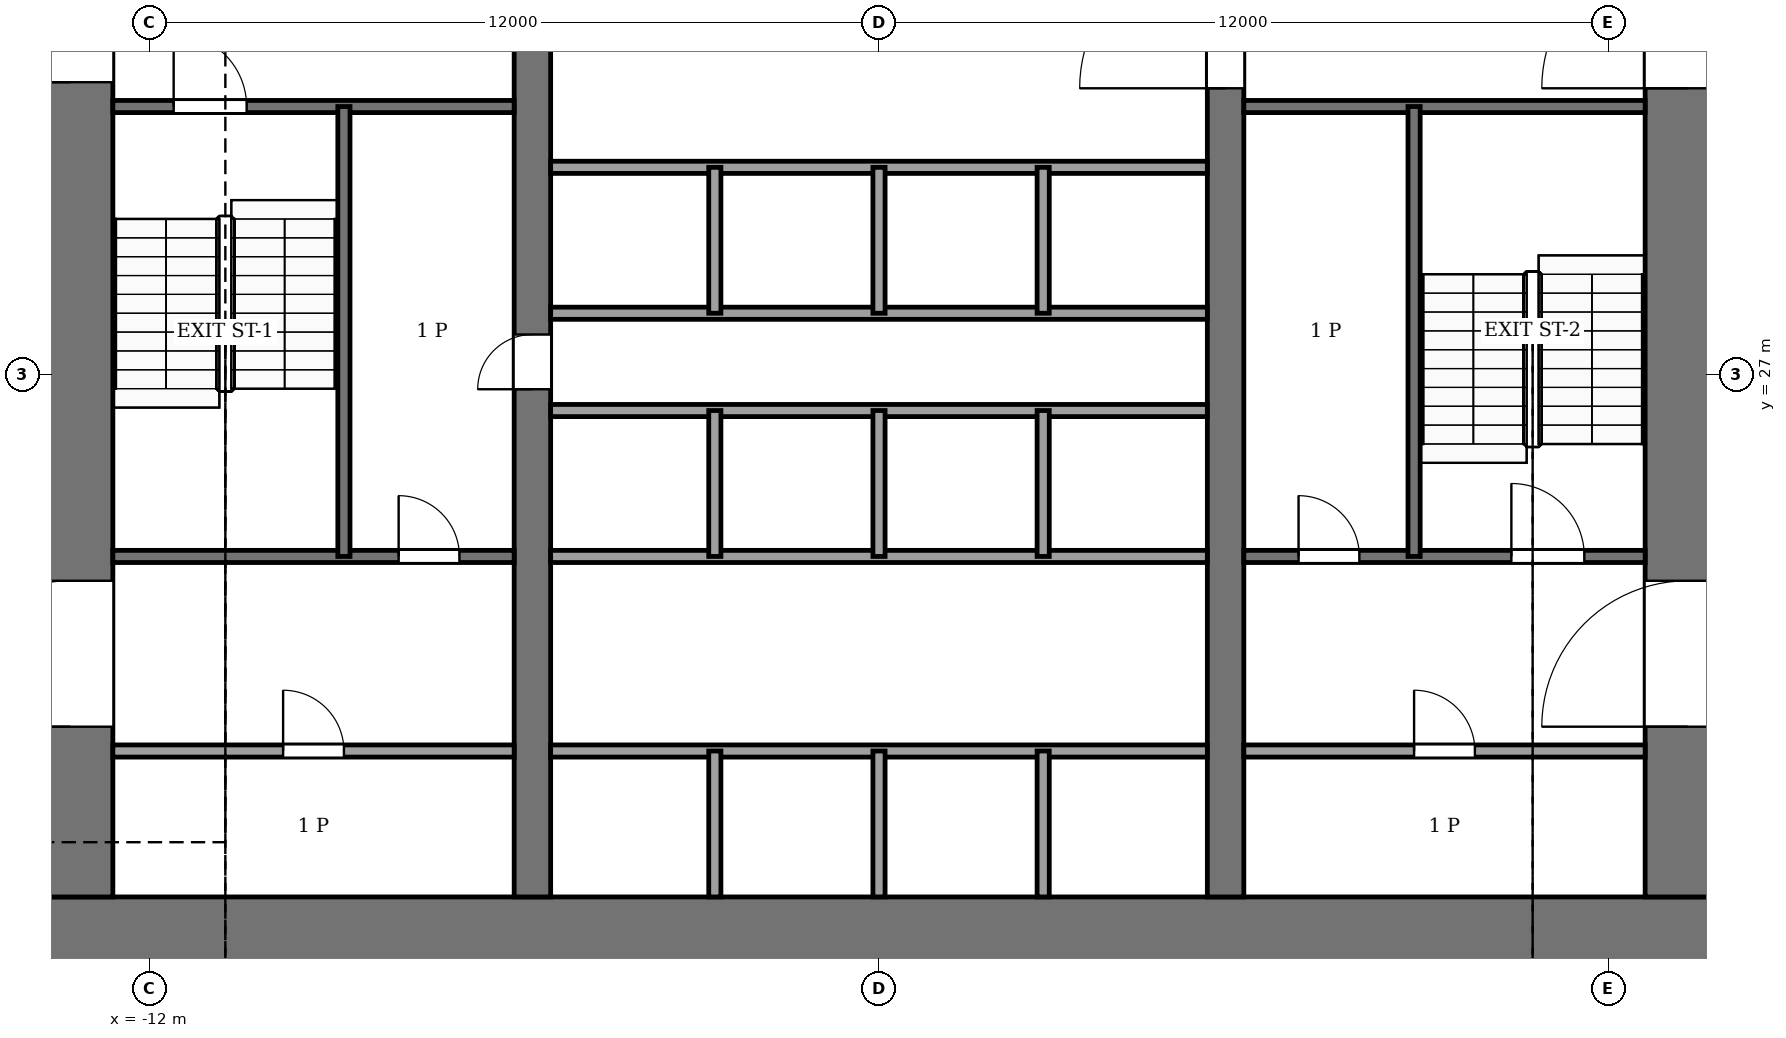
"""IFC4 building model, lengths in metres.
Left out: names, types, materials, properties, quantities, classifications, styles, units other than length and angle.
Written with IfcOpenShell. Run it as: python <this file> out.ifc"""

import sys

from ifc_helpers import new_model, si_unit, direction, frame, frame_2d, origin, place, context, subcontext, project, spatial, rectangle, extrude, element, fill, save


model = new_model("IFC4")
c1 = context("Model", 3, precision=1e-05, world=origin(), true_north=direction((0.0, 1.0)))
c2 = subcontext(c1, "Body", "Model", "MODEL_VIEW")
j1 = project(units=[si_unit("LENGTHUNIT", "METRE"), si_unit("PLANEANGLEUNIT", "RADIAN")], contexts=[c1])
p1 = place(None, origin())
s1 = spatial("IfcSite", under=j1, at=p1, CompositionType="ELEMENT")
p2 = place(p1, origin())
s2 = spatial("IfcBuilding", under=s1, at=p2, CompositionType="ELEMENT")
p3 = place(p2, frame((0.0, 0.0, 58.0)))
s3 = spatial("IfcBuildingStorey", under=s2, at=p3, CompositionType="ELEMENT", Elevation=58.0)
p4 = place(p3, frame((-14.0, 17.7, -0.25), z_axis=(0.0, 0.0, 1.0), x_axis=(1.0, 0.0, 0.0)))
e1 = element("IfcWall", 1, at=p4, inside=s3, PredefinedType="SHEAR", context=c2, shape_type="SweptSolid", body=[
    extrude(rectangle(XDim=28.0, YDim=1.4, at=frame_2d((14.0, 0.0))), origin(), (0.0, 0.0, 1.0), 7.12),
])
p5 = place(p3, frame((-13.3, 18.4, -0.25), z_axis=(0.0, 0.0, 1.0), x_axis=(0.0, 1.0, 0.0)))
e2 = element("IfcWall", 2, at=p5, inside=s3, PredefinedType="SHEAR", context=c2, shape_type="SweptSolid", body=[
    extrude(rectangle(XDim=19.2, YDim=1.4, at=frame_2d((9.6, 0.0))), origin(), (0.0, 0.0, 1.0), 7.12),
])
p6 = place(p5, frame((2.8, 0.0, 0.25)))
e3 = element("IfcOpeningElement", 3, at=p6, cuts=e2, PredefinedType="OPENING", context=c2, shape_type="SweptSolid", body=[
    extrude(rectangle(XDim=2.4, YDim=2.4, at=frame_2d((1.2, 1.2))), frame((0.0, 0.71, 0.0), z_axis=(0.0, -1.0, 0.0), x_axis=(1.0, 0.0, 0.0)), (0.0, 0.0, 1.0), 1.42),
])
p7 = place(p5, frame((13.4, 0.0, 0.25)))
e4 = element("IfcOpeningElement", 4, at=p7, cuts=e2, PredefinedType="OPENING", context=c2, shape_type="SweptSolid", body=[
    extrude(rectangle(XDim=1.4, YDim=2.2, at=frame_2d((0.7, 1.1))), frame((0.0, 0.71, 0.0), z_axis=(0.0, -1.0, 0.0), x_axis=(1.0, 0.0, 0.0)), (0.0, 0.0, 1.0), 1.42),
])
p8 = place(p3, frame((13.3, 18.4, -0.25), z_axis=(0.0, 0.0, 1.0), x_axis=(0.0, 1.0, 0.0)))
e5 = element("IfcWall", 5, at=p8, inside=s3, PredefinedType="SHEAR", context=c2, shape_type="SweptSolid", body=[
    extrude(rectangle(XDim=19.2, YDim=1.4, at=frame_2d((9.6, 0.0))), origin(), (0.0, 0.0, 1.0), 7.12),
])
p9 = place(p8, frame((2.8, 0.0, 0.25)))
e6 = element("IfcOpeningElement", 6, at=p9, cuts=e5, PredefinedType="OPENING", context=c2, shape_type="SweptSolid", body=[
    extrude(rectangle(XDim=2.4, YDim=2.4, at=frame_2d((1.2, 1.2))), frame((0.0, 0.71, 0.0), z_axis=(0.0, -1.0, 0.0), x_axis=(1.0, 0.0, 0.0)), (0.0, 0.0, 1.0), 1.42),
])
p10 = place(p8, frame((13.3, 0.0, 0.25)))
e7 = element("IfcOpeningElement", 7, at=p10, cuts=e5, PredefinedType="OPENING", context=c2, shape_type="SweptSolid", body=[
    extrude(rectangle(XDim=2.4, YDim=2.4, at=frame_2d((1.2, 1.2))), frame((0.0, 0.71, 0.0), z_axis=(0.0, -1.0, 0.0), x_axis=(1.0, 0.0, 0.0)), (0.0, 0.0, 1.0), 1.42),
])
p11 = place(p3, frame((-5.7, 18.4, -0.25), z_axis=(0.0, 0.0, 1.0), x_axis=(0.0, 1.0, 0.0)))
e8 = element("IfcWall", 8, at=p11, inside=s3, PredefinedType="SHEAR", context=c2, shape_type="SweptSolid", body=[
    extrude(rectangle(XDim=19.2, YDim=0.6, at=frame_2d((9.6, 0.0))), origin(), (0.0, 0.0, 1.0), 7.12),
])
p12 = place(p11, frame((8.35, 0.0, 0.25)))
e9 = element("IfcOpeningElement", 9, at=p12, cuts=e8, PredefinedType="OPENING", context=c2, shape_type="SweptSolid", body=[
    extrude(rectangle(XDim=0.9, YDim=2.1, at=frame_2d((0.45, 1.05))), frame((0.0, 0.31, 0.0), z_axis=(0.0, -1.0, 0.0), x_axis=(1.0, 0.0, 0.0)), (0.0, 0.0, 1.0), 0.62),
])
p13 = place(p3, frame((5.7, 18.4, -0.25), z_axis=(0.0, 0.0, 1.0), x_axis=(0.0, 1.0, 0.0)))
e10 = element("IfcWall", 10, at=p13, inside=s3, PredefinedType="SHEAR", context=c2, shape_type="SweptSolid", body=[
    extrude(rectangle(XDim=19.2, YDim=0.6, at=frame_2d((9.6, 0.0))), origin(), (0.0, 0.0, 1.0), 7.12),
])
p14 = place(p13, frame((13.3, 0.0, 0.25)))
e11 = element("IfcOpeningElement", 11, at=p14, cuts=e10, PredefinedType="OPENING", context=c2, shape_type="SweptSolid", body=[
    extrude(rectangle(XDim=2.4, YDim=2.4, at=frame_2d((1.2, 1.2))), frame((0.0, 0.31, 0.0), z_axis=(0.0, -1.0, 0.0), x_axis=(1.0, 0.0, 0.0)), (0.0, 0.0, 1.0), 0.62),
])
p15 = place(p3, frame((-12.6, 20.8, 0.0), z_axis=(0.0, 0.0, 1.0), x_axis=(1.0, 0.0, 0.0)))
e12 = element("IfcWall", 12, at=p15, inside=s3, PredefinedType="PARTITIONING", context=c2, shape_type="SweptSolid", body=[
    extrude(rectangle(XDim=6.6, YDim=0.2, at=frame_2d((3.3, 0.0))), origin(), (0.0, 0.0, 1.0), 6.87),
])
p16 = place(p15, frame((2.8, 0.0, 0.0)))
e13 = element("IfcOpeningElement", 13, at=p16, cuts=e12, PredefinedType="OPENING", context=c2, shape_type="SweptSolid", body=[
    extrude(rectangle(XDim=1.0, YDim=2.1, at=frame_2d((0.5, 1.05))), frame((0.0, 0.11, 0.0), z_axis=(0.0, -1.0, 0.0), x_axis=(1.0, 0.0, 0.0)), (0.0, 0.0, 1.0), 0.22),
])
p17 = place(p3, frame((-5.4, 20.8, 0.0), z_axis=(0.0, 0.0, 1.0), x_axis=(1.0, 0.0, 0.0)))
e14 = element("IfcWall", 14, at=p17, inside=s3, PredefinedType="PARTITIONING", context=c2, shape_type="SweptSolid", body=[
    extrude(rectangle(XDim=10.8, YDim=0.2, at=frame_2d((5.4, 0.0))), origin(), (0.0, 0.0, 1.0), 6.87),
])
p18 = place(p3, frame((6.0, 20.8, 0.0), z_axis=(0.0, 0.0, 1.0), x_axis=(1.0, 0.0, 0.0)))
e15 = element("IfcWall", 15, at=p18, inside=s3, PredefinedType="PARTITIONING", context=c2, shape_type="SweptSolid", body=[
    extrude(rectangle(XDim=6.6, YDim=0.2, at=frame_2d((3.3, 0.0))), origin(), (0.0, 0.0, 1.0), 6.87),
])
p19 = place(p18, frame((2.8, 0.0, 0.0)))
e16 = element("IfcOpeningElement", 16, at=p19, cuts=e15, PredefinedType="OPENING", context=c2, shape_type="SweptSolid", body=[
    extrude(rectangle(XDim=1.0, YDim=2.1, at=frame_2d((0.5, 1.05))), frame((0.0, 0.11, 0.0), z_axis=(0.0, -1.0, 0.0), x_axis=(1.0, 0.0, 0.0)), (0.0, 0.0, 1.0), 0.22),
])
p20 = place(p3, frame((-12.6, 24.0, 0.0), z_axis=(0.0, 0.0, 1.0), x_axis=(1.0, 0.0, 0.0)))
e17 = element("IfcWall", 17, at=p20, inside=s3, PredefinedType="PARTITIONING", context=c2, shape_type="SweptSolid", body=[
    extrude(rectangle(XDim=6.6, YDim=0.2, at=frame_2d((3.3, 0.0))), origin(), (0.0, 0.0, 1.0), 6.87),
])
p21 = place(p20, frame((4.7, 0.0, 0.0)))
e18 = element("IfcOpeningElement", 18, at=p21, cuts=e17, PredefinedType="OPENING", context=c2, shape_type="SweptSolid", body=[
    extrude(rectangle(XDim=1.0, YDim=2.1, at=frame_2d((0.5, 1.05))), frame((0.0, 0.11, 0.0), z_axis=(0.0, -1.0, 0.0), x_axis=(1.0, 0.0, 0.0)), (0.0, 0.0, 1.0), 0.22),
])
p22 = place(p3, frame((-5.4, 24.0, 0.0), z_axis=(0.0, 0.0, 1.0), x_axis=(1.0, 0.0, 0.0)))
e19 = element("IfcWall", 19, at=p22, inside=s3, PredefinedType="PARTITIONING", context=c2, shape_type="SweptSolid", body=[
    extrude(rectangle(XDim=10.8, YDim=0.2, at=frame_2d((5.4, 0.0))), origin(), (0.0, 0.0, 1.0), 6.87),
])
p23 = place(p3, frame((6.0, 24.0, 0.0), z_axis=(0.0, 0.0, 1.0), x_axis=(1.0, 0.0, 0.0)))
e20 = element("IfcWall", 20, at=p23, inside=s3, PredefinedType="PARTITIONING", context=c2, shape_type="SweptSolid", body=[
    extrude(rectangle(XDim=6.6, YDim=0.2, at=frame_2d((3.3, 0.0))), origin(), (0.0, 0.0, 1.0), 6.87),
])
p24 = place(p23, frame((0.9, 0.0, 0.0)))
e21 = element("IfcOpeningElement", 21, at=p24, cuts=e20, PredefinedType="OPENING", context=c2, shape_type="SweptSolid", body=[
    extrude(rectangle(XDim=1.0, YDim=2.1, at=frame_2d((0.5, 1.05))), frame((0.0, 0.11, 0.0), z_axis=(0.0, -1.0, 0.0), x_axis=(1.0, 0.0, 0.0)), (0.0, 0.0, 1.0), 0.22),
])
p25 = place(p23, frame((4.4, 0.0, 0.0)))
e22 = element("IfcOpeningElement", 22, at=p25, cuts=e20, PredefinedType="OPENING", context=c2, shape_type="SweptSolid", body=[
    extrude(rectangle(XDim=1.2, YDim=2.2, at=frame_2d((0.6, 1.1))), frame((0.0, 0.11, 0.0), z_axis=(0.0, -1.0, 0.0), x_axis=(1.0, 0.0, 0.0)), (0.0, 0.0, 1.0), 0.22),
])
for number, where, z_axis, x_axis in (
    (23, (-5.4, 26.4, 0.0), (0.0, 0.0, 1.0), (1.0, 0.0, 0.0)),
    (24, (-5.4, 28.0, 0.0), (0.0, 0.0, 1.0), (1.0, 0.0, 0.0)),
    (25, (-5.4, 30.4, 0.0), (0.0, 0.0, 1.0), (1.0, 0.0, 0.0)),
):
    element("IfcWall", number, at=place(p3, frame(where, z_axis=z_axis, x_axis=x_axis)), inside=s3, PredefinedType="PARTITIONING", context=c2, shape_type="SweptSolid", body=[
        extrude(rectangle(XDim=10.8, YDim=0.2, at=frame_2d((5.4, 0.0))), origin(), (0.0, 0.0, 1.0), 6.87),
    ])
p26 = place(p3, frame((-12.6, 31.4, 0.0), z_axis=(0.0, 0.0, 1.0), x_axis=(1.0, 0.0, 0.0)))
e26 = element("IfcWall", 26, at=p26, inside=s3, PredefinedType="PARTITIONING", context=c2, shape_type="SweptSolid", body=[
    extrude(rectangle(XDim=6.6, YDim=0.2, at=frame_2d((3.3, 0.0))), origin(), (0.0, 0.0, 1.0), 6.87),
])
p27 = place(p26, frame((1.0, 0.0, 0.0)))
e27 = element("IfcOpeningElement", 27, at=p27, cuts=e26, PredefinedType="OPENING", context=c2, shape_type="SweptSolid", body=[
    extrude(rectangle(XDim=1.2, YDim=2.2, at=frame_2d((0.6, 1.1))), frame((0.0, 0.11, 0.0), z_axis=(0.0, -1.0, 0.0), x_axis=(1.0, 0.0, 0.0)), (0.0, 0.0, 1.0), 0.22),
])
p28 = place(p3, frame((6.0, 31.4, 0.0), z_axis=(0.0, 0.0, 1.0), x_axis=(1.0, 0.0, 0.0)))
e28 = element("IfcWall", 28, at=p28, inside=s3, PredefinedType="PARTITIONING", context=c2, shape_type="SweptSolid", body=[
    extrude(rectangle(XDim=6.6, YDim=0.2, at=frame_2d((3.3, 0.0))), origin(), (0.0, 0.0, 1.0), 6.87),
])
p29 = place(p3, frame((-8.8, 24.0, 0.0), z_axis=(0.0, 0.0, 1.0), x_axis=(0.0, 1.0, 0.0)))
e29 = element("IfcWall", 29, at=p29, inside=s3, PredefinedType="PARTITIONING", context=c2, shape_type="SweptSolid", body=[
    extrude(rectangle(XDim=7.4, YDim=0.2, at=frame_2d((3.7, 0.0))), origin(), (0.0, 0.0, 1.0), 6.87),
])
p30 = place(p3, frame((-2.7, 18.4, 0.0), z_axis=(0.0, 0.0, 1.0), x_axis=(0.0, 1.0, 0.0)))
e30 = element("IfcWall", 30, at=p30, inside=s3, PredefinedType="PARTITIONING", context=c2, shape_type="SweptSolid", body=[
    extrude(rectangle(XDim=2.4, YDim=0.2, at=frame_2d((1.2, 0.0))), origin(), (0.0, 0.0, 1.0), 6.87),
])
for number, where, z_axis, x_axis in (
    (31, (-2.7, 24.0, 0.0), (0.0, 0.0, 1.0), (0.0, 1.0, 0.0)),
    (32, (-2.7, 28.0, 0.0), (0.0, 0.0, 1.0), (0.0, 1.0, 0.0)),
):
    element("IfcWall", number, at=place(p3, frame(where, z_axis=z_axis, x_axis=x_axis)), inside=s3, PredefinedType="PARTITIONING", context=c2, shape_type="SweptSolid", body=[
        extrude(rectangle(XDim=2.4, YDim=0.2, at=frame_2d((1.2, 0.0))), origin(), (0.0, 0.0, 1.0), 6.87),
    ])
p31 = place(p3, frame((0.0, 18.4, 0.0), z_axis=(0.0, 0.0, 1.0), x_axis=(0.0, 1.0, 0.0)))
e33 = element("IfcWall", 33, at=p31, inside=s3, PredefinedType="PARTITIONING", context=c2, shape_type="SweptSolid", body=[
    extrude(rectangle(XDim=2.4, YDim=0.2, at=frame_2d((1.2, 0.0))), origin(), (0.0, 0.0, 1.0), 6.87),
])
for number, where, z_axis, x_axis in (
    (34, (0.0, 24.0, 0.0), (0.0, 0.0, 1.0), (0.0, 1.0, 0.0)),
    (35, (0.0, 28.0, 0.0), (0.0, 0.0, 1.0), (0.0, 1.0, 0.0)),
):
    element("IfcWall", number, at=place(p3, frame(where, z_axis=z_axis, x_axis=x_axis)), inside=s3, PredefinedType="PARTITIONING", context=c2, shape_type="SweptSolid", body=[
        extrude(rectangle(XDim=2.4, YDim=0.2, at=frame_2d((1.2, 0.0))), origin(), (0.0, 0.0, 1.0), 6.87),
    ])
p32 = place(p3, frame((2.7, 18.4, 0.0), z_axis=(0.0, 0.0, 1.0), x_axis=(0.0, 1.0, 0.0)))
e36 = element("IfcWall", 36, at=p32, inside=s3, PredefinedType="PARTITIONING", context=c2, shape_type="SweptSolid", body=[
    extrude(rectangle(XDim=2.4, YDim=0.2, at=frame_2d((1.2, 0.0))), origin(), (0.0, 0.0, 1.0), 6.87),
])
for number, where, z_axis, x_axis in (
    (37, (2.7, 24.0, 0.0), (0.0, 0.0, 1.0), (0.0, 1.0, 0.0)),
    (38, (2.7, 28.0, 0.0), (0.0, 0.0, 1.0), (0.0, 1.0, 0.0)),
):
    element("IfcWall", number, at=place(p3, frame(where, z_axis=z_axis, x_axis=x_axis)), inside=s3, PredefinedType="PARTITIONING", context=c2, shape_type="SweptSolid", body=[
        extrude(rectangle(XDim=2.4, YDim=0.2, at=frame_2d((1.2, 0.0))), origin(), (0.0, 0.0, 1.0), 6.87),
    ])
p33 = place(p3, frame((8.8, 24.0, 0.0), z_axis=(0.0, 0.0, 1.0), x_axis=(0.0, 1.0, 0.0)))
e39 = element("IfcWall", 39, at=p33, inside=s3, PredefinedType="PARTITIONING", context=c2, shape_type="SweptSolid", body=[
    extrude(rectangle(XDim=7.4, YDim=0.2, at=frame_2d((3.7, 0.0))), origin(), (0.0, 0.0, 1.0), 6.87),
])
p34 = place(p16, origin())
e40 = element("IfcDoor", 40, at=p34, inside=s3, OperationType="SINGLE_SWING_LEFT", PredefinedType="DOOR", context=c2, shape_type="SweptSolid", body=[
    extrude(rectangle(XDim=1.0, YDim=2.1, at=frame_2d((0.5, 1.05))), frame((0.0, 0.025, 0.0), z_axis=(0.0, -1.0, 0.0), x_axis=(1.0, 0.0, 0.0)), (0.0, 0.0, 1.0), 0.05),
])
fill(e13, e40)
p35 = place(p19, origin())
e41 = element("IfcDoor", 41, at=p35, inside=s3, OperationType="SINGLE_SWING_RIGHT", PredefinedType="DOOR", context=c2, shape_type="SweptSolid", body=[
    extrude(rectangle(XDim=1.0, YDim=2.1, at=frame_2d((0.5, 1.05))), frame((0.0, 0.025, 0.0), z_axis=(0.0, -1.0, 0.0), x_axis=(1.0, 0.0, 0.0)), (0.0, 0.0, 1.0), 0.05),
])
fill(e16, e41)
p36 = place(p21, origin())
e42 = element("IfcDoor", 42, at=p36, inside=s3, OperationType="SINGLE_SWING_RIGHT", PredefinedType="DOOR", context=c2, shape_type="SweptSolid", body=[
    extrude(rectangle(XDim=1.0, YDim=2.1, at=frame_2d((0.5, 1.05))), frame((0.0, 0.025, 0.0), z_axis=(0.0, -1.0, 0.0), x_axis=(1.0, 0.0, 0.0)), (0.0, 0.0, 1.0), 0.05),
])
fill(e18, e42)
p37 = place(p24, origin())
e43 = element("IfcDoor", 43, at=p37, inside=s3, OperationType="SINGLE_SWING_LEFT", PredefinedType="DOOR", context=c2, shape_type="SweptSolid", body=[
    extrude(rectangle(XDim=1.0, YDim=2.1, at=frame_2d((0.5, 1.05))), frame((0.0, 0.025, 0.0), z_axis=(0.0, -1.0, 0.0), x_axis=(1.0, 0.0, 0.0)), (0.0, 0.0, 1.0), 0.05),
])
fill(e21, e43)
p38 = place(p12, origin())
e44 = element("IfcDoor", 44, at=p38, inside=s3, OperationType="SINGLE_SWING_RIGHT", PredefinedType="DOOR", context=c2, shape_type="SweptSolid", body=[
    extrude(rectangle(XDim=0.9, YDim=2.1, at=frame_2d((0.45, 1.05))), frame((0.0, 0.025, 0.0), z_axis=(0.0, -1.0, 0.0), x_axis=(1.0, 0.0, 0.0)), (0.0, 0.0, 1.0), 0.05),
])
fill(e9, e44)
p39 = place(p27, origin())
e45 = element("IfcDoor", 45, at=p39, inside=s3, OperationType="SINGLE_SWING_RIGHT", PredefinedType="DOOR", context=c2, shape_type="SweptSolid", body=[
    extrude(rectangle(XDim=1.2, YDim=2.2, at=frame_2d((0.6, 1.1))), frame((0.0, 0.025, 0.0), z_axis=(0.0, -1.0, 0.0), x_axis=(1.0, 0.0, 0.0)), (0.0, 0.0, 1.0), 0.05),
])
fill(e27, e45)
p40 = place(p25, origin())
e46 = element("IfcDoor", 46, at=p40, inside=s3, OperationType="SINGLE_SWING_LEFT", PredefinedType="DOOR", context=c2, shape_type="SweptSolid", body=[
    extrude(rectangle(XDim=1.2, YDim=2.2, at=frame_2d((0.6, 1.1))), frame((0.0, 0.025, 0.0), z_axis=(0.0, -1.0, 0.0), x_axis=(1.0, 0.0, 0.0)), (0.0, 0.0, 1.0), 0.05),
])
fill(e22, e46)
p41 = place(p14, origin())
e47 = element("IfcDoor", 47, at=p41, inside=s3, OperationType="DOUBLE_DOOR_SINGLE_SWING", PredefinedType="DOOR", context=c2, shape_type="SweptSolid", body=[
    extrude(rectangle(XDim=2.4, YDim=2.4, at=frame_2d((1.2, 1.2))), frame((0.0, 0.025, 0.0), z_axis=(0.0, -1.0, 0.0), x_axis=(1.0, 0.0, 0.0)), (0.0, 0.0, 1.0), 0.05),
])
fill(e11, e47)
p42 = place(p6, origin())
e48 = element("IfcDoor", 48, at=p42, inside=s3, OperationType="DOUBLE_DOOR_SINGLE_SWING", PredefinedType="DOOR", context=c2, shape_type="SweptSolid", body=[
    extrude(rectangle(XDim=2.4, YDim=2.4, at=frame_2d((1.2, 1.2))), frame((0.0, 0.025, 0.0), z_axis=(0.0, -1.0, 0.0), x_axis=(1.0, 0.0, 0.0)), (0.0, 0.0, 1.0), 0.05),
])
fill(e3, e48)
p43 = place(p9, origin())
e49 = element("IfcDoor", 49, at=p43, inside=s3, OperationType="DOUBLE_DOOR_SINGLE_SWING", PredefinedType="DOOR", context=c2, shape_type="SweptSolid", body=[
    extrude(rectangle(XDim=2.4, YDim=2.4, at=frame_2d((1.2, 1.2))), frame((0.0, 0.025, 0.0), z_axis=(0.0, -1.0, 0.0), x_axis=(1.0, 0.0, 0.0)), (0.0, 0.0, 1.0), 0.05),
])
fill(e6, e49)
p44 = place(p10, origin())
e50 = element("IfcDoor", 50, at=p44, inside=s3, OperationType="DOUBLE_DOOR_SINGLE_SWING", PredefinedType="DOOR", context=c2, shape_type="SweptSolid", body=[
    extrude(rectangle(XDim=2.4, YDim=2.4, at=frame_2d((1.2, 1.2))), frame((0.0, 0.025, 0.0), z_axis=(0.0, -1.0, 0.0), x_axis=(1.0, 0.0, 0.0)), (0.0, 0.0, 1.0), 0.05),
])
fill(e7, e50)
p45 = place(p7, origin())
e51 = element("IfcDoor", 51, at=p45, inside=s3, OperationType="SINGLE_SWING_RIGHT", PredefinedType="DOOR", context=c2, shape_type="SweptSolid", body=[
    extrude(rectangle(XDim=1.4, YDim=2.2, at=frame_2d((0.7, 1.1))), frame((0.0, 0.025, 0.0), z_axis=(0.0, -1.0, 0.0), x_axis=(1.0, 0.0, 0.0)), (0.0, 0.0, 1.0), 0.05),
])
fill(e4, e51)
save(model, sys.argv[1])
